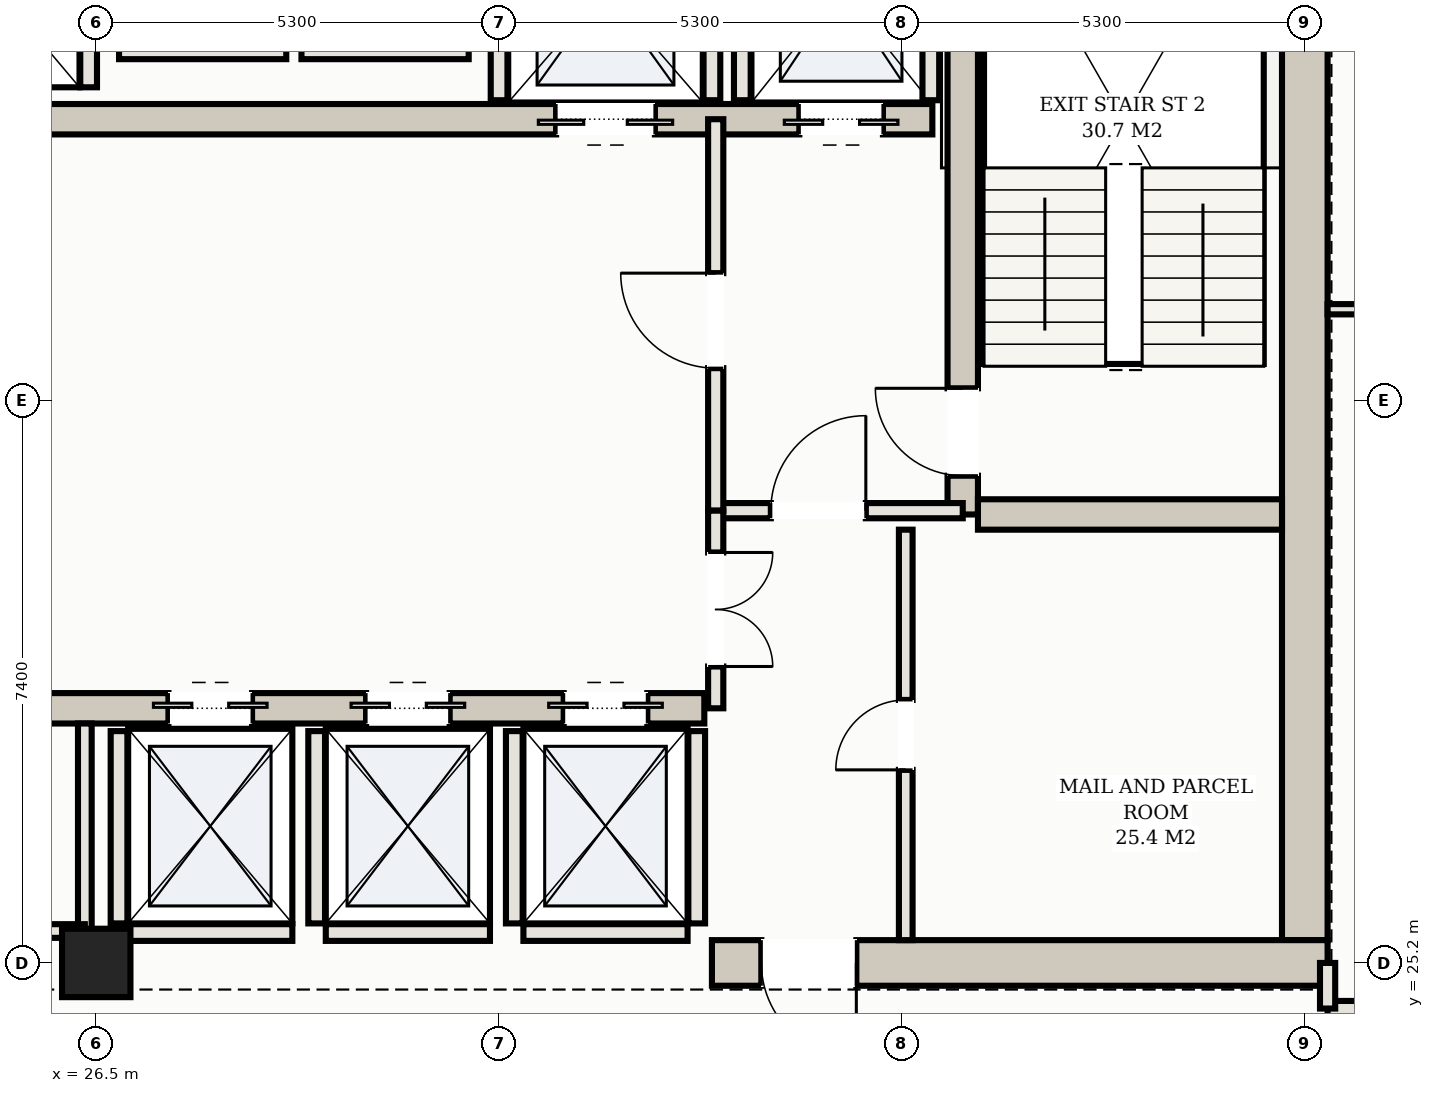
"""IFC4 building model, lengths in metres.
Left out: names, types, materials, properties, quantities, classifications, styles, units other than length and angle.
Written with IfcOpenShell. Run it as: python <this file> out.ifc"""

import sys

from ifc_helpers import new_model, si_unit, direction, frame, frame_2d, origin, origin_2d, place, context, subcontext, project, spatial, rectangle, hollow_rectangle, extrude, element, fill, save


model = new_model("IFC4")
c1 = context("Model", 3, precision=1e-05, world=origin(), true_north=direction((0.0, 1.0)))
c2 = subcontext(c1, "Body", "Model", "MODEL_VIEW")
j1 = project(units=[si_unit("LENGTHUNIT", "METRE"), si_unit("PLANEANGLEUNIT", "RADIAN")], contexts=[c1])
p1 = place(None, origin())
s1 = spatial("IfcSite", under=j1, at=p1, CompositionType="ELEMENT")
p2 = place(p1, origin())
s2 = spatial("IfcBuilding", under=s1, at=p2, CompositionType="ELEMENT")
p3 = place(p2, frame((0.0, 0.0, 139.2)))
s3 = spatial("IfcBuildingStorey", under=s2, at=p3, CompositionType="ELEMENT", Elevation=139.2)
p4 = place(p3, frame((42.4, 25.5, 0.0), z_axis=(0.0, 0.0, 1.0), x_axis=(0.0, 1.0, 0.0)))
e1 = element("IfcWall", 1, at=p4, inside=s3, PredefinedType="SHEAR", context=c2, shape_type="SweptSolid", body=[
    extrude(rectangle(XDim=14.2, YDim=0.6, at=frame_2d((7.1, 0.0))), origin(), (0.0, 0.0, 1.0), 3.1),
])
p5 = place(p3, frame((34.6, 25.2, 0.0), z_axis=(0.0, 0.0, 1.0), x_axis=(1.0, 0.0, 0.0)))
e2 = element("IfcWall", 2, at=p5, inside=s3, PredefinedType="SHEAR", context=c2, shape_type="SweptSolid", body=[
    extrude(rectangle(XDim=8.1, YDim=0.6, at=frame_2d((4.05, 0.0))), origin(), (0.0, 0.0, 1.0), 3.1),
])
p6 = place(p5, frame((0.65, 0.0, 0.0)))
e3 = element("IfcOpeningElement", 3, at=p6, cuts=e2, PredefinedType="OPENING", context=c2, shape_type="SweptSolid", body=[
    extrude(rectangle(XDim=1.25, YDim=2.2, at=frame_2d((0.625, 1.1))), frame((0.0, 0.31, 0.0), z_axis=(0.0, -1.0, 0.0), x_axis=(1.0, 0.0, 0.0)), (0.0, 0.0, 1.0), 0.62),
])
p7 = place(p3, frame((37.9, 31.1, 0.0), z_axis=(0.0, 0.0, 1.0), x_axis=(0.0, 1.0, 0.0)))
e4 = element("IfcWall", 4, at=p7, inside=s3, PredefinedType="SHEAR", context=c2, shape_type="SweptSolid", body=[
    extrude(rectangle(XDim=8.6, YDim=0.4, at=frame_2d((4.3, 0.0))), origin(), (0.0, 0.0, 1.0), 3.1),
])
p8 = place(p7, frame((0.51, 0.0, 0.0)))
e5 = element("IfcOpeningElement", 5, at=p8, cuts=e4, PredefinedType="OPENING", context=c2, shape_type="SweptSolid", body=[
    extrude(rectangle(XDim=1.15, YDim=2.2, at=frame_2d((0.575, 1.1))), frame((0.0, 0.21, 0.0), z_axis=(0.0, -1.0, 0.0), x_axis=(1.0, 0.0, 0.0)), (0.0, 0.0, 1.0), 0.42),
])
p9 = place(p3, frame((38.1, 31.1, 0.0), z_axis=(0.0, 0.0, 1.0), x_axis=(1.0, 0.0, 0.0)))
e6 = element("IfcWall", 6, at=p9, inside=s3, PredefinedType="SHEAR", context=c2, shape_type="SweptSolid", body=[
    extrude(rectangle(XDim=4.0, YDim=0.4, at=frame_2d((2.0, 0.0))), origin(), (0.0, 0.0, 1.0), 3.1),
])
p10 = place(p3, frame((15.5, 36.3, 0.0), z_axis=(0.0, 0.0, 1.0), x_axis=(1.0, 0.0, 0.0)))
e7 = element("IfcWall", 7, at=p10, inside=s3, PredefinedType="SHEAR", context=c2, shape_type="SweptSolid", body=[
    extrude(rectangle(XDim=22.0, YDim=0.4, at=frame_2d((11.0, 0.0))), origin(), (0.0, 0.0, 1.0), 3.1),
])
p11 = place(p10, frame((0.65, 0.0, 0.0)))
e8 = element("IfcOpeningElement", 8, at=p11, cuts=e7, PredefinedType="OPENING", context=c2, shape_type="SweptSolid", body=[
    extrude(rectangle(XDim=1.1, YDim=2.15, at=frame_2d((0.55, 1.075))), frame((0.0, 0.21, 0.0), z_axis=(0.0, -1.0, 0.0), x_axis=(1.0, 0.0, 0.0)), (0.0, 0.0, 1.0), 0.42),
])
p12 = place(p10, frame((20.25, 0.0, 0.0)))
e9 = element("IfcOpeningElement", 9, at=p12, cuts=e7, PredefinedType="OPENING", context=c2, shape_type="SweptSolid", body=[
    extrude(rectangle(XDim=1.1, YDim=2.15, at=frame_2d((0.55, 1.075))), frame((0.0, 0.21, 0.0), z_axis=(0.0, -1.0, 0.0), x_axis=(1.0, 0.0, 0.0)), (0.0, 0.0, 1.0), 0.42),
])
p13 = place(p10, frame((17.05, 0.0, 0.0)))
e10 = element("IfcOpeningElement", 10, at=p13, cuts=e7, PredefinedType="OPENING", context=c2, shape_type="SweptSolid", body=[
    extrude(rectangle(XDim=1.3, YDim=2.2, at=frame_2d((0.65, 1.1))), frame((0.0, 0.21, 0.0), z_axis=(0.0, -1.0, 0.0), x_axis=(1.0, 0.0, 0.0)), (0.0, 0.0, 1.0), 0.42),
])
p14 = place(p3, frame((18.5, 28.55, 0.0), z_axis=(0.0, 0.0, 1.0), x_axis=(1.0, 0.0, 0.0)))
e11 = element("IfcWall", 11, at=p14, inside=s3, PredefinedType="SHEAR", context=c2, shape_type="SweptSolid", body=[
    extrude(rectangle(XDim=16.0, YDim=0.4, at=frame_2d((8.0, 0.0))), origin(), (0.0, 0.0, 1.0), 3.1),
])
p15 = place(p14, frame((8.95, 0.0, 0.0)))
e12 = element("IfcOpeningElement", 12, at=p15, cuts=e11, PredefinedType="OPENING", context=c2, shape_type="SweptSolid", body=[
    extrude(rectangle(XDim=1.1, YDim=2.15, at=frame_2d((0.55, 1.075))), frame((0.0, 0.21, 0.0), z_axis=(0.0, -1.0, 0.0), x_axis=(1.0, 0.0, 0.0)), (0.0, 0.0, 1.0), 0.42),
])
p16 = place(p14, frame((11.55, 0.0, 0.0)))
e13 = element("IfcOpeningElement", 13, at=p16, cuts=e11, PredefinedType="OPENING", context=c2, shape_type="SweptSolid", body=[
    extrude(rectangle(XDim=1.1, YDim=2.15, at=frame_2d((0.55, 1.075))), frame((0.0, 0.21, 0.0), z_axis=(0.0, -1.0, 0.0), x_axis=(1.0, 0.0, 0.0)), (0.0, 0.0, 1.0), 0.42),
])
p17 = place(p14, frame((14.15, 0.0, 0.0)))
e14 = element("IfcOpeningElement", 14, at=p17, cuts=e11, PredefinedType="OPENING", context=c2, shape_type="SweptSolid", body=[
    extrude(rectangle(XDim=1.1, YDim=2.15, at=frame_2d((0.55, 1.075))), frame((0.0, 0.21, 0.0), z_axis=(0.0, -1.0, 0.0), x_axis=(1.0, 0.0, 0.0)), (0.0, 0.0, 1.0), 0.42),
])
p18 = place(p3, frame((26.5, 25.2, 0.0), z_axis=(0.0, 0.0, 1.0), x_axis=(1.0, 0.0, 0.0)))
e15 = element("IfcColumn", 15, at=p18, inside=s3, PredefinedType="COLUMN", context=c2, shape_type="SweptSolid", body=[
    extrude(hollow_rectangle(XDim=0.9, YDim=0.9, WallThickness=0.032, at=origin_2d()), origin(), (0.0, 0.0, 1.0), 3.3),
])
for number, where, z_axis, x_axis in (
    (16, (35.0, 36.55, 0.0), (0.0, 0.0, 1.0), (0.0, 1.0, 0.0)),
    (17, (37.48, 36.55, 0.0), (0.0, 0.0, 1.0), (0.0, 1.0, 0.0)),
    (18, (31.8, 36.55, 0.0), (0.0, 0.0, 1.0), (0.0, 1.0, 0.0)),
    (19, (34.6, 36.55, 0.0), (0.0, 0.0, 1.0), (0.0, 1.0, 0.0)),
):
    element("IfcWall", number, at=place(p3, frame(where, z_axis=z_axis, x_axis=x_axis)), inside=s3, PredefinedType="SOLIDWALL", context=c2, shape_type="SweptSolid", body=[
        extrude(rectangle(XDim=2.93, YDim=0.22, at=frame_2d((1.465, 0.0))), origin(), (0.0, 0.0, 1.0), 3.1),
    ])
p19 = place(p3, frame((26.8, 25.72, 0.0), z_axis=(0.0, 0.0, 1.0), x_axis=(0.0, 1.0, 0.0)))
e20 = element("IfcWall", 20, at=p19, inside=s3, PredefinedType="SOLIDWALL", context=c2, shape_type="SweptSolid", body=[
    extrude(rectangle(XDim=2.53, YDim=0.22, at=frame_2d((1.265, 0.0))), origin(), (0.0, 0.0, 1.0), 3.1),
])
p20 = place(p3, frame((26.92, 25.6, 0.0), z_axis=(0.0, 0.0, 1.0), x_axis=(1.0, 0.0, 0.0)))
e21 = element("IfcWall", 21, at=p20, inside=s3, PredefinedType="SOLIDWALL", context=c2, shape_type="SweptSolid", body=[
    extrude(rectangle(XDim=2.16, YDim=0.22, at=frame_2d((1.08, 0.0))), origin(), (0.0, 0.0, 1.0), 2.295),
])
p21 = place(p3, frame((29.4, 25.72, 0.0), z_axis=(0.0, 0.0, 1.0), x_axis=(0.0, 1.0, 0.0)))
e22 = element("IfcWall", 22, at=p21, inside=s3, PredefinedType="SOLIDWALL", context=c2, shape_type="SweptSolid", body=[
    extrude(rectangle(XDim=2.53, YDim=0.22, at=frame_2d((1.265, 0.0))), origin(), (0.0, 0.0, 1.0), 3.1),
])
p22 = place(p3, frame((29.52, 25.6, 0.0), z_axis=(0.0, 0.0, 1.0), x_axis=(1.0, 0.0, 0.0)))
e23 = element("IfcWall", 23, at=p22, inside=s3, PredefinedType="SOLIDWALL", context=c2, shape_type="SweptSolid", body=[
    extrude(rectangle(XDim=2.16, YDim=0.22, at=frame_2d((1.08, 0.0))), origin(), (0.0, 0.0, 1.0), 2.295),
])
for number, where, z_axis, x_axis in (
    (24, (32.0, 25.72, 0.0), (0.0, 0.0, 1.0), (0.0, 1.0, 0.0)),
    (25, (34.4, 25.72, 0.0), (0.0, 0.0, 1.0), (0.0, 1.0, 0.0)),
):
    element("IfcWall", number, at=place(p3, frame(where, z_axis=z_axis, x_axis=x_axis)), inside=s3, PredefinedType="SOLIDWALL", context=c2, shape_type="SweptSolid", body=[
        extrude(rectangle(XDim=2.53, YDim=0.22, at=frame_2d((1.265, 0.0))), origin(), (0.0, 0.0, 1.0), 3.1),
    ])
p23 = place(p3, frame((32.12, 25.6, 0.0), z_axis=(0.0, 0.0, 1.0), x_axis=(1.0, 0.0, 0.0)))
e26 = element("IfcWall", 26, at=p23, inside=s3, PredefinedType="SOLIDWALL", context=c2, shape_type="SweptSolid", body=[
    extrude(rectangle(XDim=2.16, YDim=0.22, at=frame_2d((1.08, 0.0))), origin(), (0.0, 0.0, 1.0), 2.295),
])
p24 = place(p3, frame((26.4, 36.72, 0.0), z_axis=(0.0, 0.0, 1.0), x_axis=(0.0, 1.0, 0.0)))
e27 = element("IfcWall", 27, at=p24, inside=s3, PredefinedType="SOLIDWALL", context=c2, shape_type="SweptSolid", body=[
    extrude(rectangle(XDim=2.56, YDim=0.22, at=frame_2d((1.28, 0.0))), origin(), (0.0, 0.0, 1.0), 3.1),
])
for number, where, z_axis, x_axis in (
    (28, (26.8, 37.2, 0.0), (0.0, 0.0, 1.0), (1.0, 0.0, 0.0)),
    (29, (29.2, 37.2, 0.0), (0.0, 0.0, 1.0), (1.0, 0.0, 0.0)),
):
    element("IfcWall", number, at=place(p3, frame(where, z_axis=z_axis, x_axis=x_axis)), inside=s3, PredefinedType="SOLIDWALL", context=c2, shape_type="SweptSolid", body=[
        extrude(rectangle(XDim=2.2, YDim=0.22, at=frame_2d((1.1, 0.0))), origin(), (0.0, 0.0, 1.0), 3.1),
    ])
p25 = place(p3, frame((34.65, 31.15, 0.0), z_axis=(0.0, 0.0, 1.0), x_axis=(1.0, 0.0, 0.0)))
e30 = element("IfcWall", 30, at=p25, inside=s3, PredefinedType="PARTITIONING", context=c2, shape_type="SweptSolid", body=[
    extrude(rectangle(XDim=3.25, YDim=0.2, at=frame_2d((1.625, 0.0))), origin(), (0.0, 0.0, 1.0), 2.38),
])
p26 = place(p25, frame((0.725, 0.0, 0.0)))
e31 = element("IfcOpeningElement", 31, at=p26, cuts=e30, PredefinedType="OPENING", context=c2, shape_type="SweptSolid", body=[
    extrude(rectangle(XDim=1.25, YDim=2.2, at=frame_2d((0.625, 1.1))), frame((0.0, 0.11, 0.0), z_axis=(0.0, -1.0, 0.0), x_axis=(1.0, 0.0, 0.0)), (0.0, 0.0, 1.0), 0.22),
])
p27 = place(p3, frame((34.65, 31.15, 0.0), z_axis=(0.0, 0.0, 1.0), x_axis=(0.0, 1.0, 0.0)))
e32 = element("IfcWall", 32, at=p27, inside=s3, PredefinedType="PARTITIONING", context=c2, shape_type="SweptSolid", body=[
    extrude(rectangle(XDim=5.15, YDim=0.2, at=frame_2d((2.575, 0.0))), origin(), (0.0, 0.0, 1.0), 2.38),
])
p28 = place(p27, frame((1.875, 0.0, 0.0)))
e33 = element("IfcOpeningElement", 33, at=p28, cuts=e32, PredefinedType="OPENING", context=c2, shape_type="SweptSolid", body=[
    extrude(rectangle(XDim=1.25, YDim=2.2, at=frame_2d((0.625, 1.1))), frame((0.0, 0.11, 0.0), z_axis=(0.0, -1.0, 0.0), x_axis=(1.0, 0.0, 0.0)), (0.0, 0.0, 1.0), 0.22),
])
p29 = place(p3, frame((37.15, 25.5, 0.0), z_axis=(0.0, 0.0, 1.0), x_axis=(0.0, 1.0, 0.0)))
e34 = element("IfcWall", 34, at=p29, inside=s3, PredefinedType="PARTITIONING", context=c2, shape_type="SweptSolid", body=[
    extrude(rectangle(XDim=5.4, YDim=0.18, at=frame_2d((2.7, 0.0))), origin(), (0.0, 0.0, 1.0), 2.38),
])
p30 = place(p29, frame((2.24, 0.0, 0.0)))
e35 = element("IfcOpeningElement", 35, at=p30, cuts=e34, PredefinedType="OPENING", context=c2, shape_type="SweptSolid", body=[
    extrude(rectangle(XDim=0.92, YDim=2.15, at=frame_2d((0.46, 1.075))), frame((0.0, 0.1, 0.0), z_axis=(0.0, -1.0, 0.0), x_axis=(1.0, 0.0, 0.0)), (0.0, 0.0, 1.0), 0.2),
])
p31 = place(p3, frame((34.65, 28.55, 0.0), z_axis=(0.0, 0.0, 1.0), x_axis=(0.0, 1.0, 0.0)))
e36 = element("IfcWall", 36, at=p31, inside=s3, PredefinedType="PARTITIONING", context=c2, shape_type="SweptSolid", body=[
    extrude(rectangle(XDim=2.6, YDim=0.2, at=frame_2d((1.3, 0.0))), origin(), (0.0, 0.0, 1.0), 2.38),
])
p32 = place(p31, frame((0.55, 0.0, 0.0)))
e37 = element("IfcOpeningElement", 37, at=p32, cuts=e36, PredefinedType="OPENING", context=c2, shape_type="SweptSolid", body=[
    extrude(rectangle(XDim=1.5, YDim=2.25, at=frame_2d((0.75, 1.125))), frame((0.0, 0.11, 0.0), z_axis=(0.0, -1.0, 0.0), x_axis=(1.0, 0.0, 0.0)), (0.0, 0.0, 1.0), 0.22),
])
p33 = place(p3, frame((26.35, 25.62, 0.0), z_axis=(0.0, 0.0, 1.0), x_axis=(0.0, 1.0, 0.0)))
e38 = element("IfcWall", 38, at=p33, inside=s3, PredefinedType="PARTITIONING", context=c2, shape_type="SweptSolid", body=[
    extrude(rectangle(XDim=2.73, YDim=0.18, at=frame_2d((1.365, 0.0))), origin(), (0.0, 0.0, 1.0), 2.38),
])
p34 = place(p3, frame((18.45, 25.62, 0.0), z_axis=(0.0, 0.0, 1.0), x_axis=(1.0, 0.0, 0.0)))
e39 = element("IfcWall", 39, at=p34, inside=s3, PredefinedType="PARTITIONING", context=c2, shape_type="SweptSolid", body=[
    extrude(rectangle(XDim=7.9, YDim=0.18, at=frame_2d((3.95, 0.0))), origin(), (0.0, 0.0, 1.0), 2.38),
])
p35 = place(p34, frame((3.34, 0.0, 0.0)))
e40 = element("IfcOpeningElement", 40, at=p35, cuts=e39, PredefinedType="OPENING", context=c2, shape_type="SweptSolid", body=[
    extrude(rectangle(XDim=0.92, YDim=2.15, at=frame_2d((0.46, 1.075))), frame((0.0, 0.1, 0.0), z_axis=(0.0, -1.0, 0.0), x_axis=(1.0, 0.0, 0.0)), (0.0, 0.0, 1.0), 0.2),
])
p36 = place(p3, frame((42.7, 24.6, 0.0), z_axis=(0.0, 0.0, 1.0), x_axis=(1.0, 0.0, 0.0)))
e41 = element("IfcWall", 41, at=p36, inside=s3, PredefinedType="PARTITIONING", context=c2, shape_type="SweptSolid", body=[
    extrude(rectangle(XDim=5.98, YDim=0.2, at=frame_2d((2.99, 0.0))), origin(), (0.0, 0.0, 1.0), 2.38),
])
p37 = place(p36, frame((2.53, 0.0, 0.0)))
e42 = element("IfcOpeningElement", 42, at=p37, cuts=e41, PredefinedType="OPENING", context=c2, shape_type="SweptSolid", body=[
    extrude(rectangle(XDim=0.92, YDim=2.15, at=frame_2d((0.46, 1.075))), frame((0.0, 0.11, 0.0), z_axis=(0.0, -1.0, 0.0), x_axis=(1.0, 0.0, 0.0)), (0.0, 0.0, 1.0), 0.22),
])
p38 = place(p3, frame((42.7, 24.6, 0.0), z_axis=(0.0, 0.0, 1.0), x_axis=(0.0, 1.0, 0.0)))
e43 = element("IfcWall", 43, at=p38, inside=s3, PredefinedType="PARTITIONING", context=c2, shape_type="SweptSolid", body=[
    extrude(rectangle(XDim=0.6, YDim=0.2, at=frame_2d((0.3, 0.0))), origin(), (0.0, 0.0, 1.0), 2.38),
])
p39 = place(p3, frame((42.7, 33.8, 0.0), z_axis=(0.0, 0.0, 1.0), x_axis=(1.0, 0.0, 0.0)))
e44 = element("IfcWall", 44, at=p39, inside=s3, PredefinedType="PARTITIONING", context=c2, shape_type="SweptSolid", body=[
    extrude(rectangle(XDim=5.98, YDim=0.135, at=frame_2d((2.99, 0.0))), origin(), (0.0, 0.0, 1.0), 2.38),
])
p40 = place(p39, frame((2.53, 0.0, 0.0)))
e45 = element("IfcOpeningElement", 45, at=p40, cuts=e44, PredefinedType="OPENING", context=c2, shape_type="SweptSolid", body=[
    extrude(rectangle(XDim=0.92, YDim=2.15, at=frame_2d((0.46, 1.075))), frame((0.0, 0.078, 0.0), z_axis=(0.0, -1.0, 0.0), x_axis=(1.0, 0.0, 0.0)), (0.0, 0.0, 1.0), 0.155),
])
p41 = place(p12, frame((1.1, 0.0, 0.0), z_axis=(0.0, 0.0, 1.0), x_axis=(-1.0, 0.0, 0.0)))
e46 = element("IfcDoor", 46, at=p41, inside=s3, OperationType="DOUBLE_DOOR_SLIDING", PredefinedType="DOOR", context=c2, shape_type="SweptSolid", body=[
    extrude(rectangle(XDim=1.1, YDim=2.15, at=frame_2d((0.55, 1.075))), frame((0.0, 0.025, 0.0), z_axis=(0.0, -1.0, 0.0), x_axis=(1.0, 0.0, 0.0)), (0.0, 0.0, 1.0), 0.05),
])
fill(e9, e46)
p42 = place(p13, frame((1.3, 0.0, 0.0), z_axis=(0.0, 0.0, 1.0), x_axis=(-1.0, 0.0, 0.0)))
e47 = element("IfcDoor", 47, at=p42, inside=s3, OperationType="DOUBLE_DOOR_SLIDING", PredefinedType="DOOR", context=c2, shape_type="SweptSolid", body=[
    extrude(rectangle(XDim=1.3, YDim=2.2, at=frame_2d((0.65, 1.1))), frame((0.0, 0.025, 0.0), z_axis=(0.0, -1.0, 0.0), x_axis=(1.0, 0.0, 0.0)), (0.0, 0.0, 1.0), 0.05),
])
fill(e10, e47)
p43 = place(p15, origin())
e48 = element("IfcDoor", 48, at=p43, inside=s3, OperationType="DOUBLE_DOOR_SLIDING", PredefinedType="DOOR", context=c2, shape_type="SweptSolid", body=[
    extrude(rectangle(XDim=1.1, YDim=2.15, at=frame_2d((0.55, 1.075))), frame((0.0, 0.025, 0.0), z_axis=(0.0, -1.0, 0.0), x_axis=(1.0, 0.0, 0.0)), (0.0, 0.0, 1.0), 0.05),
])
fill(e12, e48)
p44 = place(p16, origin())
e49 = element("IfcDoor", 49, at=p44, inside=s3, OperationType="DOUBLE_DOOR_SLIDING", PredefinedType="DOOR", context=c2, shape_type="SweptSolid", body=[
    extrude(rectangle(XDim=1.1, YDim=2.15, at=frame_2d((0.55, 1.075))), frame((0.0, 0.025, 0.0), z_axis=(0.0, -1.0, 0.0), x_axis=(1.0, 0.0, 0.0)), (0.0, 0.0, 1.0), 0.05),
])
fill(e13, e49)
p45 = place(p17, origin())
e50 = element("IfcDoor", 50, at=p45, inside=s3, OperationType="DOUBLE_DOOR_SLIDING", PredefinedType="DOOR", context=c2, shape_type="SweptSolid", body=[
    extrude(rectangle(XDim=1.1, YDim=2.15, at=frame_2d((0.55, 1.075))), frame((0.0, 0.025, 0.0), z_axis=(0.0, -1.0, 0.0), x_axis=(1.0, 0.0, 0.0)), (0.0, 0.0, 1.0), 0.05),
])
fill(e14, e50)
p46 = place(p6, frame((1.25, 0.0, 0.0), z_axis=(0.0, 0.0, 1.0), x_axis=(-1.0, 0.0, 0.0)))
e51 = element("IfcDoor", 51, at=p46, inside=s3, OperationType="SINGLE_SWING_LEFT", PredefinedType="DOOR", context=c2, shape_type="SweptSolid", body=[
    extrude(rectangle(XDim=1.25, YDim=2.2, at=frame_2d((0.625, 1.1))), frame((0.0, 0.025, 0.0), z_axis=(0.0, -1.0, 0.0), x_axis=(1.0, 0.0, 0.0)), (0.0, 0.0, 1.0), 0.05),
])
fill(e3, e51)
p47 = place(p26, origin())
e52 = element("IfcDoor", 52, at=p47, inside=s3, OperationType="SINGLE_SWING_RIGHT", PredefinedType="DOOR", context=c2, shape_type="SweptSolid", body=[
    extrude(rectangle(XDim=1.25, YDim=2.2, at=frame_2d((0.625, 1.1))), frame((0.0, 0.025, 0.0), z_axis=(0.0, -1.0, 0.0), x_axis=(1.0, 0.0, 0.0)), (0.0, 0.0, 1.0), 0.05),
])
fill(e31, e52)
p48 = place(p28, origin())
e53 = element("IfcDoor", 53, at=p48, inside=s3, OperationType="SINGLE_SWING_RIGHT", PredefinedType="DOOR", context=c2, shape_type="SweptSolid", body=[
    extrude(rectangle(XDim=1.25, YDim=2.2, at=frame_2d((0.625, 1.1))), frame((0.0, 0.025, 0.0), z_axis=(0.0, -1.0, 0.0), x_axis=(1.0, 0.0, 0.0)), (0.0, 0.0, 1.0), 0.05),
])
fill(e33, e53)
p49 = place(p8, origin())
e54 = element("IfcDoor", 54, at=p49, inside=s3, OperationType="SINGLE_SWING_RIGHT", PredefinedType="DOOR", context=c2, shape_type="SweptSolid", body=[
    extrude(rectangle(XDim=1.15, YDim=2.2, at=frame_2d((0.575, 1.1))), frame((0.0, 0.025, 0.0), z_axis=(0.0, -1.0, 0.0), x_axis=(1.0, 0.0, 0.0)), (0.0, 0.0, 1.0), 0.05),
])
fill(e5, e54)
p50 = place(p30, origin())
e55 = element("IfcDoor", 55, at=p50, inside=s3, OperationType="SINGLE_SWING_LEFT", PredefinedType="DOOR", context=c2, shape_type="SweptSolid", body=[
    extrude(rectangle(XDim=0.92, YDim=2.15, at=frame_2d((0.46, 1.075))), frame((0.0, 0.025, 0.0), z_axis=(0.0, -1.0, 0.0), x_axis=(1.0, 0.0, 0.0)), (0.0, 0.0, 1.0), 0.05),
])
fill(e35, e55)
p51 = place(p32, frame((1.5, 0.0, 0.0), z_axis=(0.0, 0.0, 1.0), x_axis=(-1.0, 0.0, 0.0)))
e56 = element("IfcDoor", 56, at=p51, inside=s3, OperationType="DOUBLE_DOOR_SINGLE_SWING", PredefinedType="DOOR", context=c2, shape_type="SweptSolid", body=[
    extrude(rectangle(XDim=1.5, YDim=2.25, at=frame_2d((0.75, 1.125))), frame((0.0, 0.025, 0.0), z_axis=(0.0, -1.0, 0.0), x_axis=(1.0, 0.0, 0.0)), (0.0, 0.0, 1.0), 0.05),
])
fill(e37, e56)
save(model, sys.argv[1])
